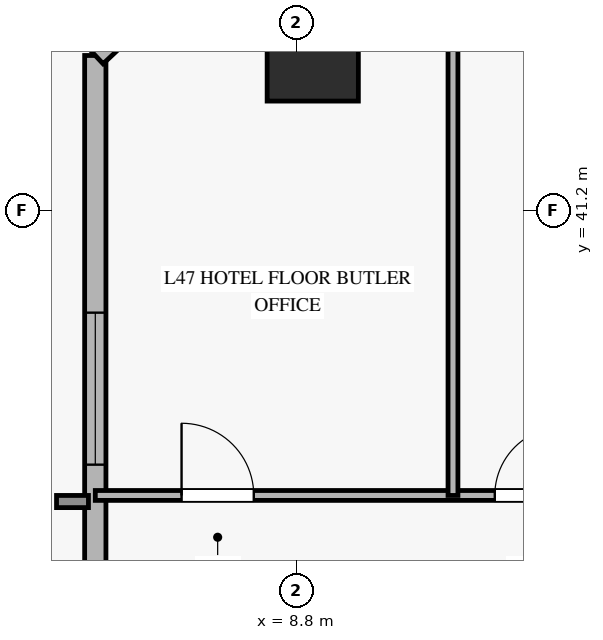
"""IFC4 building model, lengths in metres.
Left out: names, types, materials, properties, quantities, classifications, styles, units other than length and angle.
Written with IfcOpenShell. Run it as: python <this file> out.ifc"""

import sys

from ifc_helpers import new_model, si_unit, direction, frame, frame_2d, origin, origin_2d, place, context, subcontext, project, spatial, rectangle, hollow_rectangle, extrude, source, transform, mapped, element, fill, save


model = new_model("IFC4")
c1 = context("Model", 3, precision=1e-05, world=origin(), true_north=direction((0.0, 1.0)))
c2 = subcontext(c1, "Body", "Model", "MODEL_VIEW")
j1 = project(units=[si_unit("LENGTHUNIT", "METRE"), si_unit("PLANEANGLEUNIT", "RADIAN")], contexts=[c1])
p1 = place(None, origin())
s1 = spatial("IfcSite", under=j1, at=p1, CompositionType="ELEMENT")
p2 = place(p1, origin())
s2 = spatial("IfcBuilding", under=s1, at=p2, CompositionType="ELEMENT")
p3 = place(p2, frame((0.0, 0.0, 187.7)))
s3 = spatial("IfcBuildingStorey", under=s2, at=p3, CompositionType="ELEMENT", Elevation=187.7)
m1 = source(origin(), c2, "Body", "SweptSolid", [
    extrude(hollow_rectangle(XDim=1.2, YDim=1.2, WallThickness=0.055, at=origin_2d()), origin(), (0.0, 0.0, 1.0), 3.227),
])
p4 = place(p3, frame((9.015, 43.239, 0.0), z_axis=(0.064839563083, 0.008019829273, 0.997863474328), x_axis=(-0.122751882683, 0.992437391122, 0.0)))
e1 = element("IfcColumn", 1, at=p4, inside=s3, PredefinedType="COLUMN", context=c2, shape_type="MappedRepresentation", body=[
    mapped(m1, transform((0.0, 0.0, 0.0), x_axis=(1.0, 0.0, 0.0), y_axis=(0.0, 1.0, 0.0), z_axis=(0.0, 0.0, 1.0), scale=1.0)),
])
p5 = place(p3, frame((6.154, 28.477, 0.0), z_axis=(0.0, 0.0, 1.0), x_axis=(0.0, 1.0, 0.0)))
e2 = element("IfcWall", 2, at=p5, inside=s3, PredefinedType="SOLIDWALL", context=c2, shape_type="SweptSolid", body=[
    extrude(rectangle(XDim=14.762, YDim=0.28, at=frame_2d((7.381, 0.0))), origin(), (0.0, 0.0, 1.0), 2.7),
])
p6 = place(p5, frame((9.378, 0.0, 0.45)))
e3 = element("IfcOpeningElement", 3, at=p6, cuts=e2, PredefinedType="OPENING", context=c2, shape_type="SweptSolid", body=[
    extrude(rectangle(XDim=2.0, YDim=2.0, at=frame_2d((1.0, 1.0))), frame((0.0, 0.15, 0.0), z_axis=(0.0, -1.0, 0.0), x_axis=(1.0, 0.0, 0.0)), (0.0, 0.0, 1.0), 0.3),
])
p7 = place(p3, frame((9.365, 46.25, 0.0), z_axis=(0.0, 0.0, 1.0), x_axis=(-0.72945417668, -0.684029680733, 0.0)))
e4 = element("IfcWall", 4, at=p7, inside=s3, PredefinedType="SOLIDWALL", context=c2, shape_type="SweptSolid", body=[
    extrude(rectangle(XDim=4.402, YDim=0.3, at=frame_2d((2.201, 0.0))), origin(), (0.0, 0.0, 1.0), 2.7),
])
p8 = place(p7, frame((1.401, 0.0, 0.45)))
e5 = element("IfcOpeningElement", 5, at=p8, cuts=e4, PredefinedType="OPENING", context=c2, shape_type="SweptSolid", body=[
    extrude(rectangle(XDim=1.6, YDim=2.0, at=frame_2d((0.8, 1.0))), frame((0.0, 0.16, 0.0), z_axis=(0.0, -1.0, 0.0), x_axis=(1.0, 0.0, 0.0)), (0.0, 0.0, 1.0), 0.32),
])
p9 = place(p3, frame((6.154, 37.45, 0.0), z_axis=(0.0, 0.0, 1.0), x_axis=(1.0, 0.0, 0.0)))
e6 = element("IfcWall", 6, at=p9, inside=s3, PredefinedType="PARTITIONING", context=c2, shape_type="SweptSolid", body=[
    extrude(rectangle(XDim=13.096, YDim=0.13, at=frame_2d((6.548, 0.0))), origin(), (0.0, 0.0, 1.0), 2.705),
])
p10 = place(p9, frame((1.135, 0.0, 0.0)))
e7 = element("IfcOpeningElement", 7, at=p10, cuts=e6, PredefinedType="OPENING", context=c2, shape_type="SweptSolid", body=[
    extrude(rectangle(XDim=0.95, YDim=2.1, at=frame_2d((0.475, 1.05))), frame((0.0, 0.075, 0.0), z_axis=(0.0, -1.0, 0.0), x_axis=(1.0, 0.0, 0.0)), (0.0, 0.0, 1.0), 0.15),
])
p11 = place(p9, frame((5.256, 0.0, 0.0)))
e8 = element("IfcOpeningElement", 8, at=p11, cuts=e6, PredefinedType="OPENING", context=c2, shape_type="SweptSolid", body=[
    extrude(rectangle(XDim=0.9, YDim=2.1, at=frame_2d((0.45, 1.05))), frame((0.0, 0.075, 0.0), z_axis=(0.0, -1.0, 0.0), x_axis=(1.0, 0.0, 0.0)), (0.0, 0.0, 1.0), 0.15),
])
p12 = place(p3, frame((10.86, 37.45, 0.0), z_axis=(0.0, 0.0, 1.0), x_axis=(0.0, 1.0, 0.0)))
e9 = element("IfcWall", 9, at=p12, inside=s3, PredefinedType="PARTITIONING", context=c2, shape_type="SweptSolid", body=[
    extrude(rectangle(XDim=8.8, YDim=0.13, at=frame_2d((4.4, 0.0))), origin(), (0.0, 0.0, 1.0), 3.22),
])
m2 = source(origin(), c2, "Body", "SweptSolid", [
    extrude(rectangle(XDim=2.0, YDim=2.0, at=frame_2d((1.0, 1.0))), frame((0.0, 0.03, 0.0), z_axis=(0.0, -1.0, 0.0), x_axis=(1.0, 0.0, 0.0)), (0.0, 0.0, 1.0), 0.06),
])
p13 = place(p6, origin())
e10 = element("IfcWindow", 10, at=p13, inside=s3, PartitioningType="SINGLE_PANEL", PredefinedType="WINDOW", context=c2, shape_type="MappedRepresentation", body=[
    mapped(m2, transform((0.0, 0.0, 0.0), x_axis=(1.0, 0.0, 0.0), y_axis=(0.0, 1.0, 0.0), z_axis=(0.0, 0.0, 1.0), scale=1.0)),
])
fill(e3, e10)
m3 = source(origin(), c2, "Body", "SweptSolid", [
    extrude(rectangle(XDim=0.95, YDim=2.1, at=frame_2d((0.475, 1.05))), frame((0.0, 0.025, 0.0), z_axis=(0.0, -1.0, 0.0), x_axis=(1.0, 0.0, 0.0)), (0.0, 0.0, 1.0), 0.05),
])
p14 = place(p10, origin())
e11 = element("IfcDoor", 11, at=p14, inside=s3, OperationType="SINGLE_SWING_LEFT", PredefinedType="DOOR", context=c2, shape_type="MappedRepresentation", body=[
    mapped(m3, transform((0.0, 0.0, 0.0), x_axis=(1.0, 0.0, 0.0), y_axis=(0.0, 1.0, 0.0), z_axis=(0.0, 0.0, 1.0), scale=1.0)),
])
fill(e7, e11)
m4 = source(origin(), c2, "Body", "SweptSolid", [
    extrude(rectangle(XDim=0.9, YDim=2.1, at=frame_2d((0.45, 1.05))), frame((0.0, 0.025, 0.0), z_axis=(0.0, -1.0, 0.0), x_axis=(1.0, 0.0, 0.0)), (0.0, 0.0, 1.0), 0.05),
])
p15 = place(p11, origin())
e12 = element("IfcDoor", 12, at=p15, inside=s3, OperationType="SINGLE_SWING_RIGHT", PredefinedType="DOOR", context=c2, shape_type="MappedRepresentation", body=[
    mapped(m4, transform((0.0, 0.0, 0.0), x_axis=(1.0, 0.0, 0.0), y_axis=(0.0, 1.0, 0.0), z_axis=(0.0, 0.0, 1.0), scale=1.0)),
])
fill(e8, e12)
save(model, sys.argv[1])
